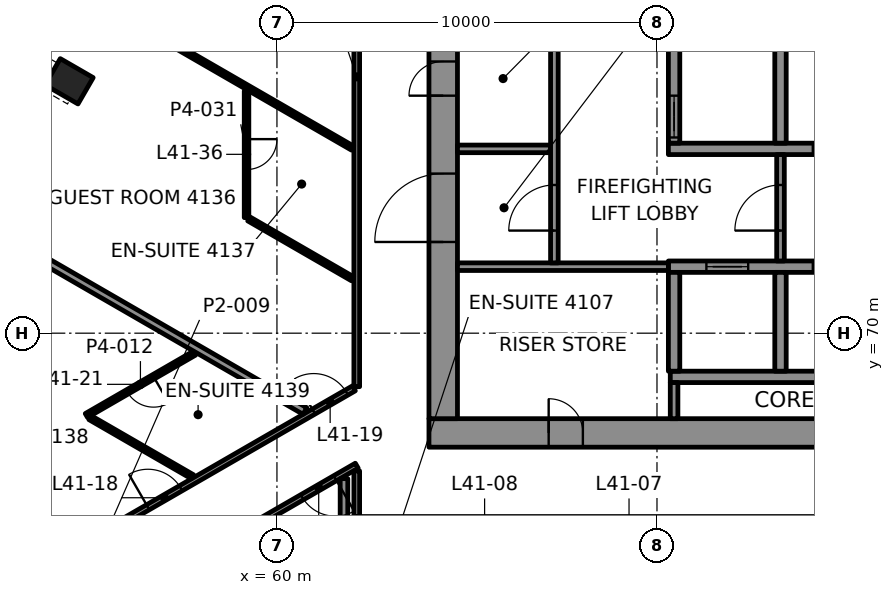
"""IFC4 building model, lengths in metres.
Left out: names, types, materials, properties, quantities, classifications, styles, units other than length and angle.
Written with IfcOpenShell. Run it as: python <this file> out.ifc"""

import sys

from ifc_helpers import new_model, si_unit, direction, frame, frame_2d, origin, origin_2d, place, context, subcontext, project, spatial, rectangle, hollow_rectangle, extrude, element, fill, save


model = new_model("IFC4")
c1 = context("Model", 3, precision=1e-05, world=origin(), true_north=direction((0.0, 1.0)))
c2 = subcontext(c1, "Body", "Model", "MODEL_VIEW")
j1 = project(units=[si_unit("LENGTHUNIT", "METRE"), si_unit("PLANEANGLEUNIT", "RADIAN")], contexts=[c1])
p1 = place(None, origin())
s1 = spatial("IfcSite", under=j1, at=p1, CompositionType="ELEMENT")
p2 = place(p1, origin())
s2 = spatial("IfcBuilding", under=s1, at=p2, CompositionType="ELEMENT")
p3 = place(p2, frame((0.0, 0.0, 179.2)))
s3 = spatial("IfcBuildingStorey", under=s2, at=p3, CompositionType="ELEMENT", Elevation=179.2)
p4 = place(p3, frame((54.532, 76.628, -0.0), z_axis=(0.0, 0.0, 1.0), x_axis=(-0.5, -0.866025403784, 0.0)))
e1 = element("IfcColumn", 1, at=p4, inside=s3, PredefinedType="COLUMN", context=c2, shape_type="SweptSolid", body=[
    extrude(hollow_rectangle(XDim=0.8, YDim=1.0, WallThickness=0.05, at=origin_2d()), origin(), (0.0, 0.0, 1.0), 3.9),
])
p5 = place(p3, frame((64.0, 67.375, 0.0), z_axis=(0.0, 0.0, 1.0), x_axis=(1.0, 0.0, 0.0)))
e2 = element("IfcWall", 2, at=p5, inside=s3, PredefinedType="SHEAR", context=c2, shape_type="SweptSolid", body=[
    extrude(rectangle(XDim=22.0, YDim=0.75, at=frame_2d((11.0, 0.0))), origin(), (0.0, 0.0, 1.0), 3.7),
])
p6 = place(p5, frame((3.15, 0.0, 0.0)))
e3 = element("IfcOpeningElement", 3, at=p6, cuts=e2, PredefinedType="OPENING", context=c2, shape_type="SweptSolid", body=[
    extrude(rectangle(XDim=0.9, YDim=2.1, at=frame_2d((0.45, 1.05))), frame((0.0, 0.385, 0.0), z_axis=(0.0, -1.0, 0.0), x_axis=(1.0, 0.0, 0.0)), (0.0, 0.0, 1.0), 0.77),
])
p7 = place(p3, frame((64.375, 67.75, 0.0), z_axis=(0.0, 0.0, 1.0), x_axis=(0.0, 1.0, 0.0)))
e4 = element("IfcWall", 4, at=p7, inside=s3, PredefinedType="SHEAR", context=c2, shape_type="SweptSolid", body=[
    extrude(rectangle(XDim=14.5, YDim=0.75, at=frame_2d((7.25, 0.0))), origin(), (0.0, 0.0, 1.0), 3.7),
])
p8 = place(p7, frame((4.65, 0.0, 0.0)))
e5 = element("IfcOpeningElement", 5, at=p8, cuts=e4, PredefinedType="OPENING", context=c2, shape_type="SweptSolid", body=[
    extrude(rectangle(XDim=1.8, YDim=2.1, at=frame_2d((0.9, 1.05))), frame((0.0, 0.385, 0.0), z_axis=(0.0, -1.0, 0.0), x_axis=(1.0, 0.0, 0.0)), (0.0, 0.0, 1.0), 0.77),
])
p9 = place(p7, frame((8.5, 0.0, 0.0)))
e6 = element("IfcOpeningElement", 6, at=p9, cuts=e4, PredefinedType="OPENING", context=c2, shape_type="SweptSolid", body=[
    extrude(rectangle(XDim=0.9, YDim=2.1, at=frame_2d((0.45, 1.05))), frame((0.0, 0.385, 0.0), z_axis=(0.0, -1.0, 0.0), x_axis=(1.0, 0.0, 0.0)), (0.0, 0.0, 1.0), 0.77),
])
p10 = place(p7, frame((12.2, 0.0, 0.0)))
e7 = element("IfcOpeningElement", 7, at=p10, cuts=e4, PredefinedType="OPENING", context=c2, shape_type="SweptSolid", body=[
    extrude(rectangle(XDim=0.9, YDim=2.1, at=frame_2d((0.45, 1.05))), frame((0.0, 0.385, 0.0), z_axis=(0.0, -1.0, 0.0), x_axis=(1.0, 0.0, 0.0)), (0.0, 0.0, 1.0), 0.77),
])
p11 = place(p3, frame((70.35, 68.85, 0.0), z_axis=(0.0, 0.0, 1.0), x_axis=(1.0, 0.0, 0.0)))
e8 = element("IfcWall", 8, at=p11, inside=s3, PredefinedType="SHEAR", context=c2, shape_type="SweptSolid", body=[
    extrude(rectangle(XDim=14.2, YDim=0.3, at=frame_2d((7.1, 0.0))), origin(), (0.0, 0.0, 1.0), 3.7),
])
p12 = place(p3, frame((70.3, 71.75, 0.0), z_axis=(0.0, 0.0, 1.0), x_axis=(1.0, 0.0, 0.0)))
e9 = element("IfcWall", 9, at=p12, inside=s3, PredefinedType="SHEAR", context=c2, shape_type="SweptSolid", body=[
    extrude(rectangle(XDim=14.3, YDim=0.3, at=frame_2d((7.15, 0.0))), origin(), (0.0, 0.0, 1.0), 3.7),
])
p13 = place(p12, frame((1.0, 0.0, 0.0)))
e10 = element("IfcOpeningElement", 10, at=p13, cuts=e9, PredefinedType="OPENING", context=c2, shape_type="SweptSolid", body=[
    extrude(rectangle(XDim=1.1, YDim=2.1, at=frame_2d((0.55, 1.05))), frame((0.0, 0.16, 0.0), z_axis=(0.0, -1.0, 0.0), x_axis=(1.0, 0.0, 0.0)), (0.0, 0.0, 1.0), 0.32),
])
p14 = place(p12, frame((3.8, 0.0, 0.0)))
e11 = element("IfcOpeningElement", 11, at=p14, cuts=e9, PredefinedType="OPENING", context=c2, shape_type="SweptSolid", body=[
    extrude(rectangle(XDim=1.1, YDim=2.1, at=frame_2d((0.55, 1.05))), frame((0.0, 0.16, 0.0), z_axis=(0.0, -1.0, 0.0), x_axis=(1.0, 0.0, 0.0)), (0.0, 0.0, 1.0), 0.32),
])
p15 = place(p12, frame((6.6, 0.0, 0.0)))
e12 = element("IfcOpeningElement", 12, at=p15, cuts=e9, PredefinedType="OPENING", context=c2, shape_type="SweptSolid", body=[
    extrude(rectangle(XDim=1.1, YDim=2.1, at=frame_2d((0.55, 1.05))), frame((0.0, 0.16, 0.0), z_axis=(0.0, -1.0, 0.0), x_axis=(1.0, 0.0, 0.0)), (0.0, 0.0, 1.0), 0.32),
])
p16 = place(p12, frame((9.4, 0.0, 0.0)))
e13 = element("IfcOpeningElement", 13, at=p16, cuts=e9, PredefinedType="OPENING", context=c2, shape_type="SweptSolid", body=[
    extrude(rectangle(XDim=1.1, YDim=2.1, at=frame_2d((0.55, 1.05))), frame((0.0, 0.16, 0.0), z_axis=(0.0, -1.0, 0.0), x_axis=(1.0, 0.0, 0.0)), (0.0, 0.0, 1.0), 0.32),
])
p17 = place(p12, frame((12.2, 0.0, 0.0)))
e14 = element("IfcOpeningElement", 14, at=p17, cuts=e9, PredefinedType="OPENING", context=c2, shape_type="SweptSolid", body=[
    extrude(rectangle(XDim=1.1, YDim=2.1, at=frame_2d((0.55, 1.05))), frame((0.0, 0.16, 0.0), z_axis=(0.0, -1.0, 0.0), x_axis=(1.0, 0.0, 0.0)), (0.0, 0.0, 1.0), 0.32),
])
p18 = place(p3, frame((70.3, 74.85, 0.0), z_axis=(0.0, 0.0, 1.0), x_axis=(1.0, 0.0, 0.0)))
e15 = element("IfcWall", 15, at=p18, inside=s3, PredefinedType="SHEAR", context=c2, shape_type="SweptSolid", body=[
    extrude(rectangle(XDim=14.3, YDim=0.3, at=frame_2d((7.15, 0.0))), origin(), (0.0, 0.0, 1.0), 3.7),
])
p19 = place(p18, frame((3.8, 0.0, 0.0)))
e16 = element("IfcOpeningElement", 16, at=p19, cuts=e15, PredefinedType="OPENING", context=c2, shape_type="SweptSolid", body=[
    extrude(rectangle(XDim=1.1, YDim=2.1, at=frame_2d((0.55, 1.05))), frame((0.0, 0.16, 0.0), z_axis=(0.0, -1.0, 0.0), x_axis=(1.0, 0.0, 0.0)), (0.0, 0.0, 1.0), 0.32),
])
p20 = place(p18, frame((12.2, 0.0, 0.0)))
e17 = element("IfcOpeningElement", 17, at=p20, cuts=e15, PredefinedType="OPENING", context=c2, shape_type="SweptSolid", body=[
    extrude(rectangle(XDim=1.1, YDim=2.1, at=frame_2d((0.55, 1.05))), frame((0.0, 0.16, 0.0), z_axis=(0.0, -1.0, 0.0), x_axis=(1.0, 0.0, 0.0)), (0.0, 0.0, 1.0), 0.32),
])
p21 = place(p3, frame((70.45, 69.0, 0.0), z_axis=(0.0, 0.0, 1.0), x_axis=(0.0, 1.0, 0.0)))
e18 = element("IfcWall", 18, at=p21, inside=s3, PredefinedType="SHEAR", context=c2, shape_type="SweptSolid", body=[
    extrude(rectangle(XDim=2.6, YDim=0.3, at=frame_2d((1.3, 0.0))), origin(), (0.0, 0.0, 1.0), 3.7),
])
p22 = place(p3, frame((70.45, 75.0, 0.0), z_axis=(0.0, 0.0, 1.0), x_axis=(0.0, 1.0, 0.0)))
e19 = element("IfcWall", 19, at=p22, inside=s3, PredefinedType="SHEAR", context=c2, shape_type="SweptSolid", body=[
    extrude(rectangle(XDim=2.6, YDim=0.3, at=frame_2d((1.3, 0.0))), origin(), (0.0, 0.0, 1.0), 3.7),
])
p23 = place(p22, frame((0.15, 0.0, 0.0)))
e20 = element("IfcOpeningElement", 20, at=p23, cuts=e19, PredefinedType="OPENING", context=c2, shape_type="SweptSolid", body=[
    extrude(rectangle(XDim=1.1, YDim=2.1, at=frame_2d((0.55, 1.05))), frame((0.0, 0.16, 0.0), z_axis=(0.0, -1.0, 0.0), x_axis=(1.0, 0.0, 0.0)), (0.0, 0.0, 1.0), 0.32),
])
for number, where, z_axis, x_axis in (
    (21, (73.25, 69.0, 0.0), (0.0, 0.0, 1.0), (0.0, 1.0, 0.0)),
    (22, (73.25, 75.0, 0.0), (0.0, 0.0, 1.0), (0.0, 1.0, 0.0)),
):
    element("IfcWall", number, at=place(p3, frame(where, z_axis=z_axis, x_axis=x_axis)), inside=s3, PredefinedType="SHEAR", context=c2, shape_type="SweptSolid", body=[
        extrude(rectangle(XDim=2.6, YDim=0.3, at=frame_2d((1.3, 0.0))), origin(), (0.0, 0.0, 1.0), 3.7),
    ])
p24 = place(p3, frame((62.1, 66.513, 0.0), z_axis=(0.0, 0.0, 1.0), x_axis=(-0.866025334814, -0.500000119461, 0.0)))
e23 = element("IfcWall", 23, at=p24, inside=s3, PredefinedType="PARTITIONING", context=c2, shape_type="SweptSolid", body=[
    extrude(rectangle(XDim=14.03, YDim=0.15, at=frame_2d((7.015, 0.0))), origin(), (0.0, 0.0, 1.0), 2.947),
])
p25 = place(p24, frame((0.656, 0.0, 0.0)))
e24 = element("IfcOpeningElement", 24, at=p25, cuts=e23, PredefinedType="OPENING", context=c2, shape_type="SweptSolid", body=[
    extrude(rectangle(XDim=1.0, YDim=2.1, at=frame_2d((0.5, 1.05))), frame((0.0, 0.085, 0.0), z_axis=(0.0, -1.0, 0.0), x_axis=(1.0, 0.0, 0.0)), (0.0, 0.0, 1.0), 0.17),
])
p26 = place(p24, frame((6.582, 0.0, 0.0)))
e25 = element("IfcOpeningElement", 25, at=p26, cuts=e23, PredefinedType="OPENING", context=c2, shape_type="SweptSolid", body=[
    extrude(rectangle(XDim=1.0, YDim=2.1, at=frame_2d((0.5, 1.05))), frame((0.0, 0.085, 0.0), z_axis=(0.0, -1.0, 0.0), x_axis=(1.0, 0.0, 0.0)), (0.0, 0.0, 1.0), 0.17),
])
p27 = place(p3, frame((49.05, 61.057, 0.0), z_axis=(0.0, 0.0, 1.0), x_axis=(0.866027379905, 0.499996577244, 0.0)))
e26 = element("IfcWall", 26, at=p27, inside=s3, PredefinedType="PARTITIONING", context=c2, shape_type="SweptSolid", body=[
    extrude(rectangle(XDim=14.982, YDim=0.15, at=frame_2d((7.491, 0.0))), origin(), (0.0, 0.0, 1.0), 3.1),
])
p28 = place(p27, frame((0.532, 0.0, 0.0)))
e27 = element("IfcOpeningElement", 27, at=p28, cuts=e26, PredefinedType="OPENING", context=c2, shape_type="SweptSolid", body=[
    extrude(rectangle(XDim=1.0, YDim=2.1, at=frame_2d((0.5, 1.05))), frame((0.0, 0.085, 0.0), z_axis=(0.0, -1.0, 0.0), x_axis=(1.0, 0.0, 0.0)), (0.0, 0.0, 1.0), 0.17),
])
p29 = place(p27, frame((8.725, 0.0, 0.0)))
e28 = element("IfcOpeningElement", 28, at=p29, cuts=e26, PredefinedType="OPENING", context=c2, shape_type="SweptSolid", body=[
    extrude(rectangle(XDim=1.0, YDim=2.1, at=frame_2d((0.5, 1.05))), frame((0.0, 0.085, 0.0), z_axis=(0.0, -1.0, 0.0), x_axis=(1.0, 0.0, 0.0)), (0.0, 0.0, 1.0), 0.17),
])
p30 = place(p27, frame((13.76, 0.0, 0.0)))
e29 = element("IfcOpeningElement", 29, at=p30, cuts=e26, PredefinedType="OPENING", context=c2, shape_type="SweptSolid", body=[
    extrude(rectangle(XDim=1.0, YDim=2.1, at=frame_2d((0.5, 1.05))), frame((0.0, 0.085, 0.0), z_axis=(0.0, -1.0, 0.0), x_axis=(1.0, 0.0, 0.0)), (0.0, 0.0, 1.0), 0.17),
])
p31 = place(p3, frame((57.83, 69.475, 0.0), z_axis=(0.0, 0.0, 1.0), x_axis=(-0.866038236991, -0.499977771575, 0.0)))
e30 = element("IfcWall", 30, at=p31, inside=s3, PredefinedType="PARTITIONING", context=c2, shape_type="SweptSolid", body=[
    extrude(rectangle(XDim=3.283, YDim=0.12, at=frame_2d((1.642, 0.0))), origin(), (0.0, 0.0, 1.0), 3.1),
])
p32 = place(p31, frame((1.242, 0.0, 0.0)))
e31 = element("IfcOpeningElement", 31, at=p32, cuts=e30, PredefinedType="OPENING", context=c2, shape_type="SweptSolid", body=[
    extrude(rectangle(XDim=0.8, YDim=2.1, at=frame_2d((0.4, 1.05))), frame((0.0, 0.07, 0.0), z_axis=(0.0, -1.0, 0.0), x_axis=(1.0, 0.0, 0.0)), (0.0, 0.0, 1.0), 0.14),
])
p33 = place(p3, frame((62.1, 65.175, 0.0), z_axis=(0.0, 0.0, 1.0), x_axis=(0.0, 1.0, 0.0)))
e32 = element("IfcWall", 32, at=p33, inside=s3, PredefinedType="PARTITIONING", context=c2, shape_type="SweptSolid", body=[
    extrude(rectangle(XDim=1.201, YDim=0.15, at=frame_2d((0.601, 0.0))), origin(), (0.0, 0.0, 1.0), 2.947),
])
p34 = place(p3, frame((62.1, 68.591, 0.0), z_axis=(0.0, 0.0, 1.0), x_axis=(0.0, 1.0, 0.0)))
e33 = element("IfcWall", 33, at=p34, inside=s3, PredefinedType="PARTITIONING", context=c2, shape_type="SweptSolid", body=[
    extrude(rectangle(XDim=16.308, YDim=0.15, at=frame_2d((8.154, 0.0))), origin(), (0.0, 0.0, 1.0), 3.1),
])
p35 = place(p3, frame((61.764, 55.36, 0.0), z_axis=(0.0, 0.0, 1.0), x_axis=(0.0, 1.0, 0.0)))
e34 = element("IfcWall", 34, at=p35, inside=s3, PredefinedType="PARTITIONING", context=c2, shape_type="SweptSolid", body=[
    extrude(rectangle(XDim=10.813, YDim=0.2, at=frame_2d((5.406, 0.0))), origin(), (0.0, 0.0, 1.0), 2.947),
])
p36 = place(p3, frame((59.2, 76.371, 0.0), z_axis=(0.0, 0.0, 1.0), x_axis=(0.0, -1.0, 0.0)))
e35 = element("IfcWall", 35, at=p36, inside=s3, PredefinedType="PARTITIONING", context=c2, shape_type="SweptSolid", body=[
    extrude(rectangle(XDim=3.329, YDim=0.12, at=frame_2d((1.665, 0.0))), origin(), (0.0, 0.0, 1.0), 3.1),
])
p37 = place(p36, frame((1.265, 0.0, 0.0)))
e36 = element("IfcOpeningElement", 36, at=p37, cuts=e35, PredefinedType="OPENING", context=c2, shape_type="SweptSolid", body=[
    extrude(rectangle(XDim=0.8, YDim=2.1, at=frame_2d((0.4, 1.05))), frame((0.0, 0.07, 0.0), z_axis=(0.0, -1.0, 0.0), x_axis=(1.0, 0.0, 0.0)), (0.0, 0.0, 1.0), 0.14),
])
p38 = place(p3, frame((61.99, 74.869, 0.0), z_axis=(0.0, 0.0, 1.0), x_axis=(-0.866017924271, 0.500012954673, 0.0)))
e37 = element("IfcWall", 37, at=p38, inside=s3, PredefinedType="PARTITIONING", context=c2, shape_type="SweptSolid", body=[
    extrude(rectangle(XDim=8.439, YDim=0.12, at=frame_2d((4.219, 0.0))), origin(), (0.0, 0.0, 1.0), 3.022),
])
p39 = place(p3, frame((61.99, 71.431, 0.0), z_axis=(0.0, 0.0, 1.0), x_axis=(-0.866028267601, 0.499995039691, 0.0)))
e38 = element("IfcWall", 38, at=p39, inside=s3, PredefinedType="PARTITIONING", context=c2, shape_type="SweptSolid", body=[
    extrude(rectangle(XDim=3.153, YDim=0.12, at=frame_2d((1.576, 0.0))), origin(), (0.0, 0.0, 1.0), 3.1),
])
p40 = place(p3, frame((60.737, 67.951, 0.0), z_axis=(0.0, 0.0, 1.0), x_axis=(-0.866033683985, 0.499985657998, 0.0)))
e39 = element("IfcWall", 39, at=p40, inside=s3, PredefinedType="PARTITIONING", context=c2, shape_type="SweptSolid", body=[
    extrude(rectangle(XDim=10.813, YDim=0.2, at=frame_2d((5.406, 0.0))), origin(), (0.0, 0.0, 1.0), 3.022),
])
p41 = place(p3, frame((57.776, 66.222, 0.0), z_axis=(0.0, 0.0, 1.0), x_axis=(-0.866009247561, 0.500027982357, 0.0)))
e40 = element("IfcWall", 40, at=p41, inside=s3, PredefinedType="PARTITIONING", context=c2, shape_type="SweptSolid", body=[
    extrude(rectangle(XDim=3.113, YDim=0.12, at=frame_2d((1.556, 0.0))), origin(), (0.0, 0.0, 1.0), 3.1),
])
p42 = place(p3, frame((54.119, 64.13, 0.0), z_axis=(0.0, 0.0, 1.0), x_axis=(-0.866016957496, 0.500014629116, 0.0)))
e41 = element("IfcWall", 41, at=p42, inside=s3, PredefinedType="PARTITIONING", context=c2, shape_type="SweptSolid", body=[
    extrude(rectangle(XDim=6.992, YDim=0.2, at=frame_2d((3.496, 0.0))), origin(), (0.0, 0.0, 1.0), 3.1),
])
p43 = place(p3, frame((64.75, 71.75, 0.0), z_axis=(0.0, 0.0, 1.0), x_axis=(1.0, 0.0, 0.0)))
e42 = element("IfcWall", 42, at=p43, inside=s3, PredefinedType="PARTITIONING", context=c2, shape_type="SweptSolid", body=[
    extrude(rectangle(XDim=5.55, YDim=0.2, at=frame_2d((2.775, 0.0))), origin(), (0.0, 0.0, 1.0), 3.7),
])
p44 = place(p3, frame((64.75, 74.85, 0.0), z_axis=(0.0, 0.0, 1.0), x_axis=(1.0, 0.0, 0.0)))
e43 = element("IfcWall", 43, at=p44, inside=s3, PredefinedType="PARTITIONING", context=c2, shape_type="SweptSolid", body=[
    extrude(rectangle(XDim=2.45, YDim=0.2, at=frame_2d((1.225, 0.0))), origin(), (0.0, 0.0, 1.0), 3.7),
])
p45 = place(p3, frame((67.3, 71.85, 0.0), z_axis=(0.0, 0.0, 1.0), x_axis=(0.0, 1.0, 0.0)))
e44 = element("IfcWall", 44, at=p45, inside=s3, PredefinedType="PARTITIONING", context=c2, shape_type="SweptSolid", body=[
    extrude(rectangle(XDim=5.75, YDim=0.2, at=frame_2d((2.875, 0.0))), origin(), (0.0, 0.0, 1.0), 3.7),
])
p46 = place(p45, frame((0.85, 0.0, 0.0)))
e45 = element("IfcOpeningElement", 45, at=p46, cuts=e44, PredefinedType="OPENING", context=c2, shape_type="SweptSolid", body=[
    extrude(rectangle(XDim=1.2, YDim=2.1, at=frame_2d((0.6, 1.05))), frame((0.0, 0.11, 0.0), z_axis=(0.0, -1.0, 0.0), x_axis=(1.0, 0.0, 0.0)), (0.0, 0.0, 1.0), 0.22),
])
p47 = place(p3, frame((70.45, 67.75, 0.0), z_axis=(0.0, 0.0, 1.0), x_axis=(0.0, 1.0, 0.0)))
e46 = element("IfcWall", 46, at=p47, inside=s3, PredefinedType="PARTITIONING", context=c2, shape_type="SweptSolid", body=[
    extrude(rectangle(XDim=0.95, YDim=0.2, at=frame_2d((0.475, 0.0))), origin(), (0.0, 0.0, 1.0), 3.7),
])
p48 = place(p3, frame((73.25, 71.9, 0.0), z_axis=(0.0, 0.0, 1.0), x_axis=(0.0, 1.0, 0.0)))
e47 = element("IfcWall", 47, at=p48, inside=s3, PredefinedType="PARTITIONING", context=c2, shape_type="SweptSolid", body=[
    extrude(rectangle(XDim=2.8, YDim=0.2, at=frame_2d((1.4, 0.0))), origin(), (0.0, 0.0, 1.0), 3.7),
])
p49 = place(p48, frame((0.8, 0.0, 0.0)))
e48 = element("IfcOpeningElement", 48, at=p49, cuts=e47, PredefinedType="OPENING", context=c2, shape_type="SweptSolid", body=[
    extrude(rectangle(XDim=1.2, YDim=2.1, at=frame_2d((0.6, 1.05))), frame((0.0, 0.11, 0.0), z_axis=(0.0, -1.0, 0.0), x_axis=(1.0, 0.0, 0.0)), (0.0, 0.0, 1.0), 0.22),
])
p50 = place(p25, origin())
e49 = element("IfcDoor", 49, at=p50, inside=s3, OperationType="SINGLE_SWING_RIGHT", PredefinedType="DOOR", context=c2, shape_type="SweptSolid", body=[
    extrude(rectangle(XDim=1.0, YDim=2.1, at=frame_2d((0.5, 1.05))), frame((0.0, 0.025, 0.0), z_axis=(0.0, -1.0, 0.0), x_axis=(1.0, 0.0, 0.0)), (0.0, 0.0, 1.0), 0.05),
])
fill(e24, e49)
p51 = place(p29, origin())
e50 = element("IfcDoor", 50, at=p51, inside=s3, OperationType="SINGLE_SWING_LEFT", PredefinedType="DOOR", context=c2, shape_type="SweptSolid", body=[
    extrude(rectangle(XDim=1.0, YDim=2.1, at=frame_2d((0.5, 1.05))), frame((0.0, 0.025, 0.0), z_axis=(0.0, -1.0, 0.0), x_axis=(1.0, 0.0, 0.0)), (0.0, 0.0, 1.0), 0.05),
])
fill(e28, e50)
p52 = place(p30, origin())
e51 = element("IfcDoor", 51, at=p52, inside=s3, OperationType="SINGLE_SWING_LEFT", PredefinedType="DOOR", context=c2, shape_type="SweptSolid", body=[
    extrude(rectangle(XDim=1.0, YDim=2.1, at=frame_2d((0.5, 1.05))), frame((0.0, 0.025, 0.0), z_axis=(0.0, -1.0, 0.0), x_axis=(1.0, 0.0, 0.0)), (0.0, 0.0, 1.0), 0.05),
])
fill(e29, e51)
p53 = place(p32, origin())
e52 = element("IfcDoor", 52, at=p53, inside=s3, OperationType="SINGLE_SWING_LEFT", PredefinedType="DOOR", context=c2, shape_type="SweptSolid", body=[
    extrude(rectangle(XDim=0.8, YDim=2.1, at=frame_2d((0.4, 1.05))), frame((0.0, 0.025, 0.0), z_axis=(0.0, -1.0, 0.0), x_axis=(1.0, 0.0, 0.0)), (0.0, 0.0, 1.0), 0.05),
])
fill(e31, e52)
p54 = place(p37, origin())
e53 = element("IfcDoor", 53, at=p54, inside=s3, OperationType="SINGLE_SWING_LEFT", PredefinedType="DOOR", context=c2, shape_type="SweptSolid", body=[
    extrude(rectangle(XDim=0.8, YDim=2.1, at=frame_2d((0.4, 1.05))), frame((0.0, 0.025, 0.0), z_axis=(0.0, -1.0, 0.0), x_axis=(1.0, 0.0, 0.0)), (0.0, 0.0, 1.0), 0.05),
])
fill(e36, e53)
p55 = place(p13, origin())
e54 = element("IfcDoor", 54, at=p55, inside=s3, OperationType="DOUBLE_DOOR_SLIDING", PredefinedType="DOOR", context=c2, shape_type="SweptSolid", body=[
    extrude(rectangle(XDim=1.1, YDim=2.1, at=frame_2d((0.55, 1.05))), frame((0.0, 0.025, 0.0), z_axis=(0.0, -1.0, 0.0), x_axis=(1.0, 0.0, 0.0)), (0.0, 0.0, 1.0), 0.05),
])
fill(e10, e54)
p56 = place(p14, origin())
e55 = element("IfcDoor", 55, at=p56, inside=s3, OperationType="DOUBLE_DOOR_SLIDING", PredefinedType="DOOR", context=c2, shape_type="SweptSolid", body=[
    extrude(rectangle(XDim=1.1, YDim=2.1, at=frame_2d((0.55, 1.05))), frame((0.0, 0.025, 0.0), z_axis=(0.0, -1.0, 0.0), x_axis=(1.0, 0.0, 0.0)), (0.0, 0.0, 1.0), 0.05),
])
fill(e11, e55)
p57 = place(p23, origin())
e56 = element("IfcDoor", 56, at=p57, inside=s3, OperationType="DOUBLE_DOOR_SLIDING", PredefinedType="DOOR", context=c2, shape_type="SweptSolid", body=[
    extrude(rectangle(XDim=1.1, YDim=2.1, at=frame_2d((0.55, 1.05))), frame((0.0, 0.025, 0.0), z_axis=(0.0, -1.0, 0.0), x_axis=(1.0, 0.0, 0.0)), (0.0, 0.0, 1.0), 0.05),
])
fill(e20, e56)
p58 = place(p19, origin())
e57 = element("IfcDoor", 57, at=p58, inside=s3, OperationType="DOUBLE_DOOR_SLIDING", PredefinedType="DOOR", context=c2, shape_type="SweptSolid", body=[
    extrude(rectangle(XDim=1.1, YDim=2.1, at=frame_2d((0.55, 1.05))), frame((0.0, 0.025, 0.0), z_axis=(0.0, -1.0, 0.0), x_axis=(1.0, 0.0, 0.0)), (0.0, 0.0, 1.0), 0.05),
])
fill(e16, e57)
p59 = place(p49, origin())
e58 = element("IfcDoor", 58, at=p59, inside=s3, OperationType="SINGLE_SWING_LEFT", PredefinedType="DOOR", context=c2, shape_type="SweptSolid", body=[
    extrude(rectangle(XDim=1.2, YDim=2.1, at=frame_2d((0.6, 1.05))), frame((0.0, 0.025, 0.0), z_axis=(0.0, -1.0, 0.0), x_axis=(1.0, 0.0, 0.0)), (0.0, 0.0, 1.0), 0.05),
])
fill(e48, e58)
p60 = place(p46, origin())
e59 = element("IfcDoor", 59, at=p60, inside=s3, OperationType="SINGLE_SWING_RIGHT", PredefinedType="DOOR", context=c2, shape_type="SweptSolid", body=[
    extrude(rectangle(XDim=1.2, YDim=2.1, at=frame_2d((0.6, 1.05))), frame((0.0, 0.025, 0.0), z_axis=(0.0, -1.0, 0.0), x_axis=(1.0, 0.0, 0.0)), (0.0, 0.0, 1.0), 0.05),
])
fill(e45, e59)
p61 = place(p8, origin())
e60 = element("IfcDoor", 60, at=p61, inside=s3, OperationType="SINGLE_SWING_LEFT", PredefinedType="DOOR", context=c2, shape_type="SweptSolid", body=[
    extrude(rectangle(XDim=1.8, YDim=2.1, at=frame_2d((0.9, 1.05))), frame((0.0, 0.095, 0.0), z_axis=(0.0, -1.0, 0.0), x_axis=(1.0, 0.0, 0.0)), (0.0, 0.0, 1.0), 0.19),
])
fill(e5, e60)
p62 = place(p6, origin())
e61 = element("IfcDoor", 61, at=p62, inside=s3, OperationType="SINGLE_SWING_LEFT", PredefinedType="DOOR", context=c2, shape_type="SweptSolid", body=[
    extrude(rectangle(XDim=0.9, YDim=2.1, at=frame_2d((0.45, 1.05))), frame((0.0, 0.095, 0.0), z_axis=(0.0, -1.0, 0.0), x_axis=(1.0, 0.0, 0.0)), (0.0, 0.0, 1.0), 0.19),
])
fill(e3, e61)
p63 = place(p9, origin())
e62 = element("IfcDoor", 62, at=p63, inside=s3, OperationType="SINGLE_SWING_RIGHT", PredefinedType="DOOR", context=c2, shape_type="SweptSolid", body=[
    extrude(rectangle(XDim=0.9, YDim=2.1, at=frame_2d((0.45, 1.05))), frame((0.0, 0.095, 0.0), z_axis=(0.0, -1.0, 0.0), x_axis=(1.0, 0.0, 0.0)), (0.0, 0.0, 1.0), 0.19),
])
fill(e6, e62)
save(model, sys.argv[1])
